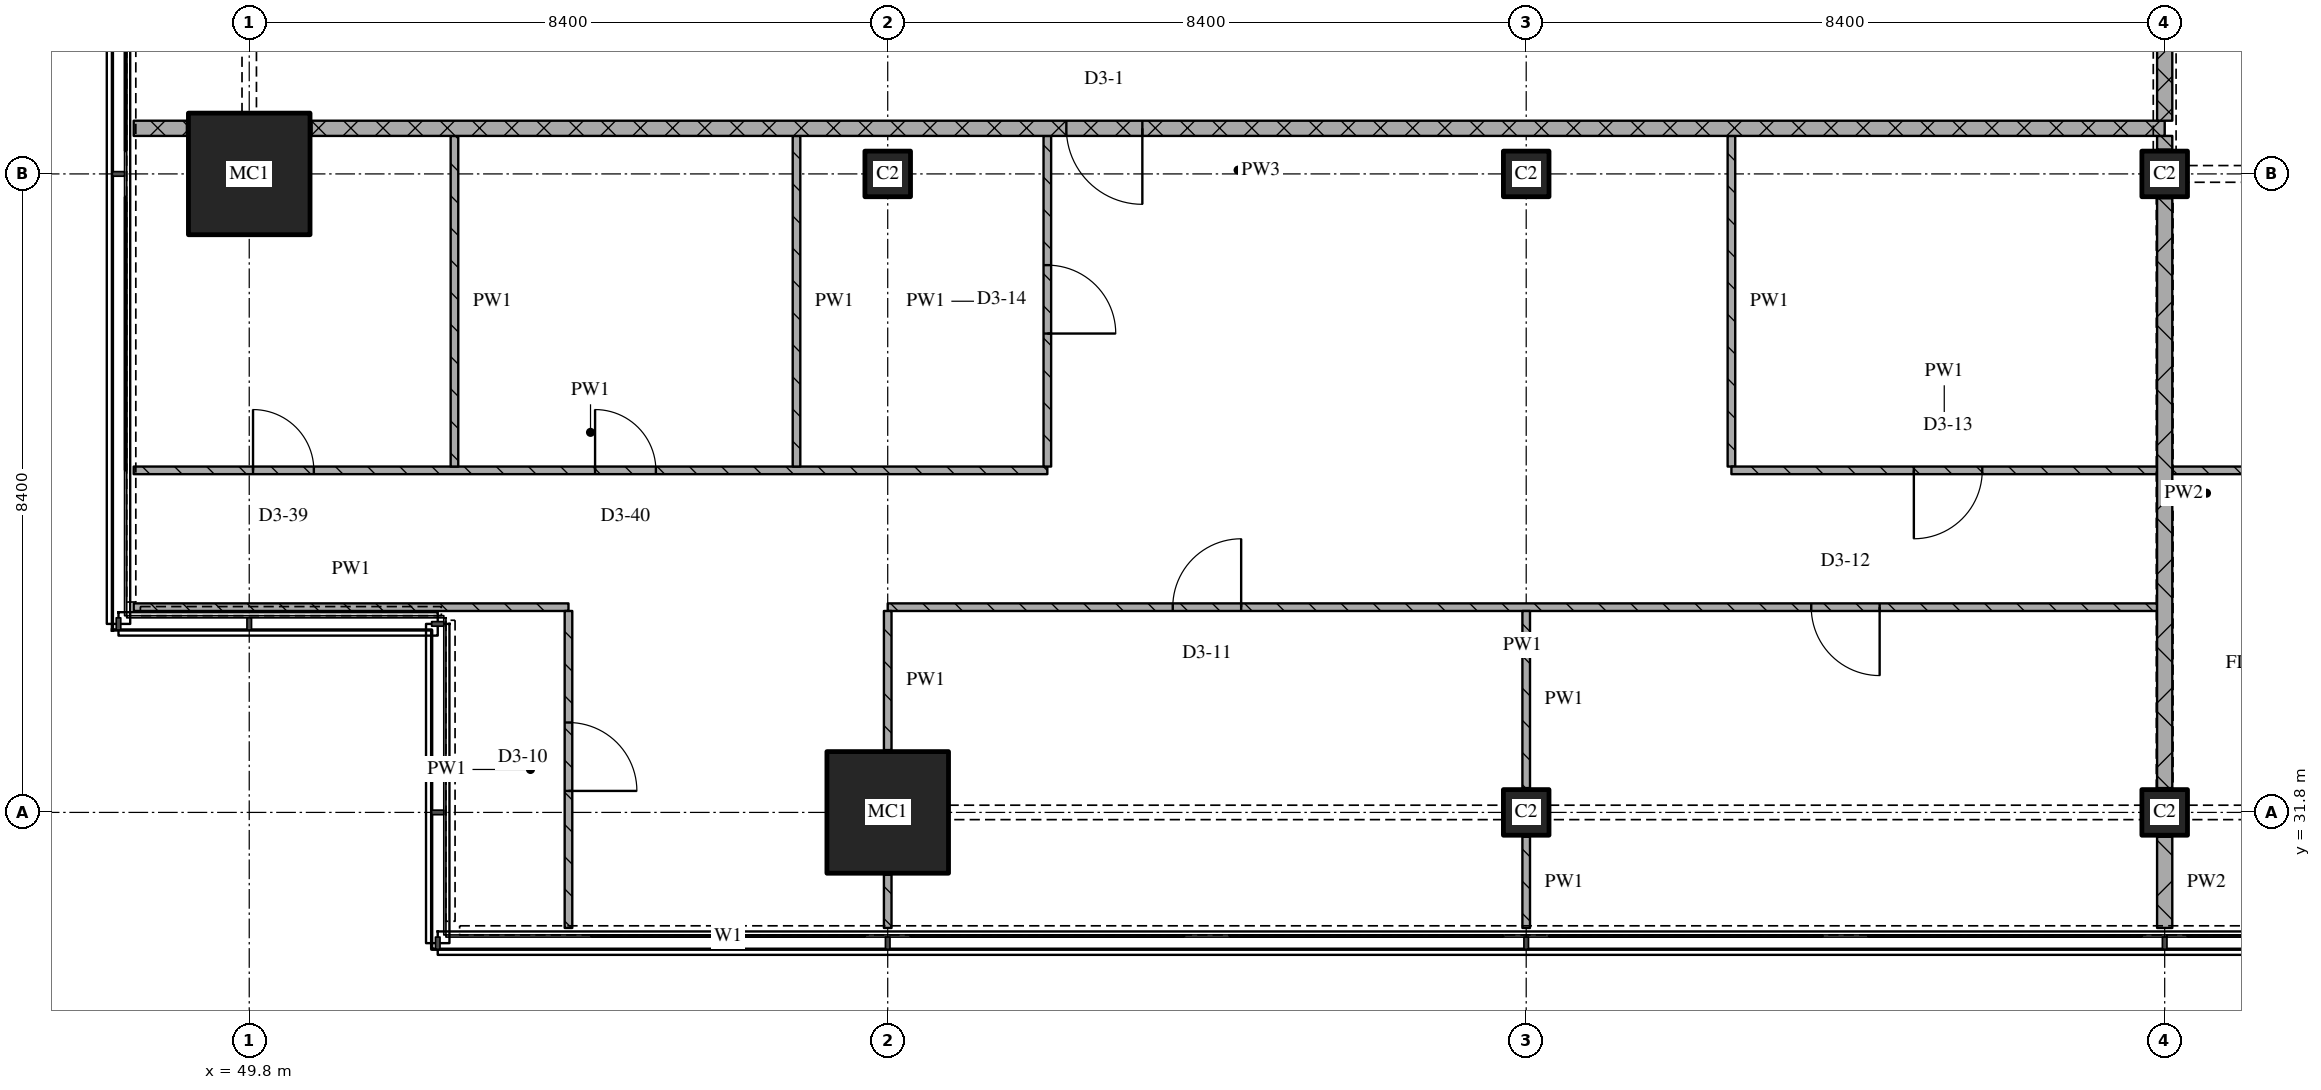
"""IFC4 building model, lengths in metres.
Left out: names, types, materials, properties, quantities, classifications, styles, units other than length and angle.
Written with IfcOpenShell. Run it as: python <this file> out.ifc"""

import sys

from ifc_helpers import new_model, si_unit, direction, frame, frame_2d, origin, origin_2d, place, context, subcontext, project, spatial, rectangle, extrude, element, fill, save


model = new_model("IFC4")
c1 = context("Model", 3, precision=1e-05, world=origin(), true_north=direction((0.0, 1.0)))
c2 = subcontext(c1, "Body", "Model", "MODEL_VIEW")
j1 = project(units=[si_unit("LENGTHUNIT", "METRE"), si_unit("PLANEANGLEUNIT", "RADIAN")], contexts=[c1])
p1 = place(None, origin())
s1 = spatial("IfcSite", under=j1, at=p1, CompositionType="ELEMENT")
p2 = place(p1, origin())
s2 = spatial("IfcBuilding", under=s1, at=p2, CompositionType="ELEMENT")
p3 = place(p2, frame((0.0, 0.0, 230.7)))
s3 = spatial("IfcBuildingStorey", under=s2, at=p3, CompositionType="ELEMENT", Elevation=230.7)
for number, where, z_axis, x_axis in (
    (1, (49.8, 40.2, 0.0), (0.0, 0.0, 1.0), (1.0, 0.0, 0.0)),
    (2, (58.2, 31.8, 0.0), (0.0, 0.0, 1.0), (1.0, 0.0, 0.0)),
):
    element("IfcColumn", number, at=place(p3, frame(where, z_axis=z_axis, x_axis=x_axis)), inside=s3, PredefinedType="COLUMN", context=c2, shape_type="SweptSolid", body=[
        extrude(rectangle(XDim=1.6, YDim=1.6, at=origin_2d()), origin(), (0.0, 0.0, 1.0), 3.6),
    ])
for number, where, z_axis, x_axis in (
    (3, (58.2, 40.2, 0.0), (0.0, 0.0, 1.0), (1.0, 0.0, 0.0)),
    (4, (66.6, 31.8, 0.0), (0.0, 0.0, 1.0), (1.0, 0.0, 0.0)),
    (5, (66.6, 40.2, 0.0), (0.0, 0.0, 1.0), (1.0, 0.0, 0.0)),
    (6, (75.0, 31.8, 0.0), (0.0, 0.0, 1.0), (1.0, 0.0, 0.0)),
    (7, (75.0, 40.2, 0.0), (0.0, 0.0, 1.0), (1.0, 0.0, 0.0)),
):
    element("IfcColumn", number, at=place(p3, frame(where, z_axis=z_axis, x_axis=x_axis)), inside=s3, PredefinedType="COLUMN", context=c2, shape_type="SweptSolid", body=[
        extrude(rectangle(XDim=0.6, YDim=0.6, at=origin_2d()), origin(), (0.0, 0.0, 1.0), 3.6),
    ])
p4 = place(p3, frame((48.28, 34.5, 0.0), z_axis=(0.0, 0.0, 1.0), x_axis=(1.0, 0.0, 0.0)))
e8 = element("IfcWall", 8, at=p4, inside=s3, PredefinedType="PARTITIONING", context=c2, shape_type="SweptSolid", body=[
    extrude(rectangle(XDim=5.72, YDim=0.1, at=frame_2d((2.86, 0.0))), origin(), (0.0, 0.0, 1.0), 3.32),
])
p5 = place(p3, frame((74.9, 34.5, 0.0), z_axis=(0.0, 0.0, 1.0), x_axis=(-1.0, 0.0, 0.0)))
e9 = element("IfcWall", 9, at=p5, inside=s3, PredefinedType="PARTITIONING", context=c2, shape_type="SweptSolid", body=[
    extrude(rectangle(XDim=16.7, YDim=0.1, at=frame_2d((8.35, 0.0))), origin(), (0.0, 0.0, 1.0), 3.32),
])
p6 = place(p5, frame((3.65, 0.0, 0.0)))
e10 = element("IfcOpeningElement", 10, at=p6, cuts=e9, PredefinedType="OPENING", context=c2, shape_type="SweptSolid", body=[
    extrude(rectangle(XDim=0.9, YDim=2.1, at=frame_2d((0.45, 1.05))), frame((0.0, 0.06, 0.0), z_axis=(0.0, -1.0, 0.0), x_axis=(1.0, 0.0, 0.0)), (0.0, 0.0, 1.0), 0.12),
])
p7 = place(p5, frame((12.05, 0.0, 0.0)))
e11 = element("IfcOpeningElement", 11, at=p7, cuts=e9, PredefinedType="OPENING", context=c2, shape_type="SweptSolid", body=[
    extrude(rectangle(XDim=0.9, YDim=2.1, at=frame_2d((0.45, 1.05))), frame((0.0, 0.06, 0.0), z_axis=(0.0, -1.0, 0.0), x_axis=(1.0, 0.0, 0.0)), (0.0, 0.0, 1.0), 0.12),
])
p8 = place(p3, frame((48.28, 36.3, 0.0), z_axis=(0.0, 0.0, 1.0), x_axis=(1.0, 0.0, 0.0)))
e12 = element("IfcWall", 12, at=p8, inside=s3, PredefinedType="PARTITIONING", context=c2, shape_type="SweptSolid", body=[
    extrude(rectangle(XDim=12.02, YDim=0.1, at=frame_2d((6.01, 0.0))), origin(), (0.0, 0.0, 1.0), 3.32),
])
p9 = place(p8, frame((1.57, 0.0, 0.0)))
e13 = element("IfcOpeningElement", 13, at=p9, cuts=e12, PredefinedType="OPENING", context=c2, shape_type="SweptSolid", body=[
    extrude(rectangle(XDim=0.8, YDim=2.1, at=frame_2d((0.4, 1.05))), frame((0.0, 0.06, 0.0), z_axis=(0.0, -1.0, 0.0), x_axis=(1.0, 0.0, 0.0)), (0.0, 0.0, 1.0), 0.12),
])
p10 = place(p8, frame((6.07, 0.0, 0.0)))
e14 = element("IfcOpeningElement", 14, at=p10, cuts=e12, PredefinedType="OPENING", context=c2, shape_type="SweptSolid", body=[
    extrude(rectangle(XDim=0.8, YDim=2.1, at=frame_2d((0.4, 1.05))), frame((0.0, 0.06, 0.0), z_axis=(0.0, -1.0, 0.0), x_axis=(1.0, 0.0, 0.0)), (0.0, 0.0, 1.0), 0.12),
])
p11 = place(p3, frame((48.28, 40.8, 0.0), z_axis=(0.0, 0.0, 1.0), x_axis=(1.0, 0.0, 0.0)))
e15 = element("IfcWall", 15, at=p11, inside=s3, PredefinedType="PARTITIONING", context=c2, shape_type="SweptSolid", body=[
    extrude(rectangle(XDim=0.7, YDim=0.2, at=frame_2d((0.35, 0.0))), origin(), (0.0, 0.0, 1.0), 3.32),
])
p12 = place(p3, frame((75.0, 40.8, 0.0), z_axis=(0.0, 0.0, 1.0), x_axis=(-1.0, 0.0, 0.0)))
e16 = element("IfcWall", 16, at=p12, inside=s3, PredefinedType="PARTITIONING", context=c2, shape_type="SweptSolid", body=[
    extrude(rectangle(XDim=24.38, YDim=0.2, at=frame_2d((12.19, 0.0))), origin(), (0.0, 0.0, 1.0), 3.32),
])
p13 = place(p12, frame((13.45, 0.0, 0.0)))
e17 = element("IfcOpeningElement", 17, at=p13, cuts=e16, PredefinedType="OPENING", context=c2, shape_type="SweptSolid", body=[
    extrude(rectangle(XDim=1.0, YDim=2.1, at=frame_2d((0.5, 1.05))), frame((0.0, 0.11, 0.0), z_axis=(0.0, -1.0, 0.0), x_axis=(1.0, 0.0, 0.0)), (0.0, 0.0, 1.0), 0.22),
])
p14 = place(p3, frame((52.5, 40.7, 0.0), z_axis=(0.0, 0.0, 1.0), x_axis=(0.0, -1.0, 0.0)))
e18 = element("IfcWall", 18, at=p14, inside=s3, PredefinedType="PARTITIONING", context=c2, shape_type="SweptSolid", body=[
    extrude(rectangle(XDim=4.35, YDim=0.1, at=frame_2d((2.175, 0.0))), origin(), (0.0, 0.0, 1.0), 3.32),
])
p15 = place(p3, frame((54.0, 30.28, 0.0), z_axis=(0.0, 0.0, 1.0), x_axis=(0.0, 1.0, 0.0)))
e19 = element("IfcWall", 19, at=p15, inside=s3, PredefinedType="PARTITIONING", context=c2, shape_type="SweptSolid", body=[
    extrude(rectangle(XDim=4.17, YDim=0.1, at=frame_2d((2.085, 0.0))), origin(), (0.0, 0.0, 1.0), 3.32),
])
p16 = place(p15, frame((1.803, 0.0, 0.0)))
e20 = element("IfcOpeningElement", 20, at=p16, cuts=e19, PredefinedType="OPENING", context=c2, shape_type="SweptSolid", body=[
    extrude(rectangle(XDim=0.9, YDim=2.1, at=frame_2d((0.45, 1.05))), frame((0.0, 0.06, 0.0), z_axis=(0.0, -1.0, 0.0), x_axis=(1.0, 0.0, 0.0)), (0.0, 0.0, 1.0), 0.12),
])
p17 = place(p3, frame((57.0, 40.7, 0.0), z_axis=(0.0, 0.0, 1.0), x_axis=(0.0, -1.0, 0.0)))
e21 = element("IfcWall", 21, at=p17, inside=s3, PredefinedType="PARTITIONING", context=c2, shape_type="SweptSolid", body=[
    extrude(rectangle(XDim=4.35, YDim=0.1, at=frame_2d((2.175, 0.0))), origin(), (0.0, 0.0, 1.0), 3.32),
])
p18 = place(p3, frame((58.2, 30.98, 0.0), z_axis=(0.0, 0.0, 1.0), x_axis=(0.0, -1.0, 0.0)))
e22 = element("IfcWall", 22, at=p18, inside=s3, PredefinedType="PARTITIONING", context=c2, shape_type="SweptSolid", body=[
    extrude(rectangle(XDim=0.7, YDim=0.1, at=frame_2d((0.35, 0.0))), origin(), (0.0, 0.0, 1.0), 3.32),
])
p19 = place(p3, frame((58.2, 34.45, 0.0), z_axis=(0.0, 0.0, 1.0), x_axis=(0.0, -1.0, 0.0)))
e23 = element("IfcWall", 23, at=p19, inside=s3, PredefinedType="PARTITIONING", context=c2, shape_type="SweptSolid", body=[
    extrude(rectangle(XDim=1.83, YDim=0.1, at=frame_2d((0.915, 0.0))), origin(), (0.0, 0.0, 1.0), 3.32),
])
p20 = place(p3, frame((60.3, 36.35, 0.0), z_axis=(0.0, 0.0, 1.0), x_axis=(0.0, 1.0, 0.0)))
e24 = element("IfcWall", 24, at=p20, inside=s3, PredefinedType="PARTITIONING", context=c2, shape_type="SweptSolid", body=[
    extrude(rectangle(XDim=4.35, YDim=0.1, at=frame_2d((2.175, 0.0))), origin(), (0.0, 0.0, 1.0), 3.32),
])
p21 = place(p20, frame((1.75, 0.0, 0.0)))
e25 = element("IfcOpeningElement", 25, at=p21, cuts=e24, PredefinedType="OPENING", context=c2, shape_type="SweptSolid", body=[
    extrude(rectangle(XDim=0.9, YDim=2.1, at=frame_2d((0.45, 1.05))), frame((0.0, 0.06, 0.0), z_axis=(0.0, -1.0, 0.0), x_axis=(1.0, 0.0, 0.0)), (0.0, 0.0, 1.0), 0.12),
])
p22 = place(p3, frame((66.6, 31.48, 0.0), z_axis=(0.0, 0.0, 1.0), x_axis=(0.0, -1.0, 0.0)))
e26 = element("IfcWall", 26, at=p22, inside=s3, PredefinedType="PARTITIONING", context=c2, shape_type="SweptSolid", body=[
    extrude(rectangle(XDim=1.2, YDim=0.1, at=frame_2d((0.6, 0.0))), origin(), (0.0, 0.0, 1.0), 3.32),
])
p23 = place(p3, frame((66.6, 34.45, 0.0), z_axis=(0.0, 0.0, 1.0), x_axis=(0.0, -1.0, 0.0)))
e27 = element("IfcWall", 27, at=p23, inside=s3, PredefinedType="PARTITIONING", context=c2, shape_type="SweptSolid", body=[
    extrude(rectangle(XDim=2.33, YDim=0.1, at=frame_2d((1.165, 0.0))), origin(), (0.0, 0.0, 1.0), 3.32),
])
p24 = place(p3, frame((69.3, 40.7, 0.0), z_axis=(0.0, 0.0, 1.0), x_axis=(0.0, -1.0, 0.0)))
e28 = element("IfcWall", 28, at=p24, inside=s3, PredefinedType="PARTITIONING", context=c2, shape_type="SweptSolid", body=[
    extrude(rectangle(XDim=4.35, YDim=0.1, at=frame_2d((2.175, 0.0))), origin(), (0.0, 0.0, 1.0), 3.32),
])
p25 = place(p3, frame((75.0, 43.1, 0.0), z_axis=(0.0, 0.0, 1.0), x_axis=(0.0, -1.0, 0.0)))
e29 = element("IfcWall", 29, at=p25, inside=s3, PredefinedType="PARTITIONING", context=c2, shape_type="SweptSolid", body=[
    extrude(rectangle(XDim=2.2, YDim=0.2, at=frame_2d((1.1, 0.0))), origin(), (0.0, 0.0, 1.0), 2.53),
])
p26 = place(p3, frame((75.0, 31.48, 0.0), z_axis=(0.0, 0.0, 1.0), x_axis=(0.0, -1.0, 0.0)))
e30 = element("IfcWall", 30, at=p26, inside=s3, PredefinedType="PARTITIONING", context=c2, shape_type="SweptSolid", body=[
    extrude(rectangle(XDim=1.2, YDim=0.2, at=frame_2d((0.6, 0.0))), origin(), (0.0, 0.0, 1.0), 3.32),
])
p27 = place(p3, frame((75.0, 39.88, 0.0), z_axis=(0.0, 0.0, 1.0), x_axis=(0.0, -1.0, 0.0)))
e31 = element("IfcWall", 31, at=p27, inside=s3, PredefinedType="PARTITIONING", context=c2, shape_type="SweptSolid", body=[
    extrude(rectangle(XDim=7.76, YDim=0.2, at=frame_2d((3.88, 0.0))), origin(), (0.0, 0.0, 1.0), 2.72),
])
p28 = place(p3, frame((75.0, 40.7, 0.0), z_axis=(0.0, 0.0, 1.0), x_axis=(0.0, -1.0, 0.0)))
e32 = element("IfcWall", 32, at=p28, inside=s3, PredefinedType="PARTITIONING", context=c2, shape_type="SweptSolid", body=[
    extrude(rectangle(XDim=0.18, YDim=0.2, at=frame_2d((0.09, 0.0))), origin(), (0.0, 0.0, 1.0), 3.32),
])
p29 = place(p3, frame((69.3, 36.3, 0.0), z_axis=(0.0, 0.0, 1.0), x_axis=(1.0, 0.0, 0.0)))
e33 = element("IfcWall", 33, at=p29, inside=s3, PredefinedType="PARTITIONING", context=c2, shape_type="SweptSolid", body=[
    extrude(rectangle(XDim=5.6, YDim=0.1, at=frame_2d((2.8, 0.0))), origin(), (0.0, 0.0, 1.0), 3.32),
])
p30 = place(p29, frame((2.4, 0.0, 0.0)))
e34 = element("IfcOpeningElement", 34, at=p30, cuts=e33, PredefinedType="OPENING", context=c2, shape_type="SweptSolid", body=[
    extrude(rectangle(XDim=0.9, YDim=2.1, at=frame_2d((0.45, 1.05))), frame((0.0, 0.06, 0.0), z_axis=(0.0, -1.0, 0.0), x_axis=(1.0, 0.0, 0.0)), (0.0, 0.0, 1.0), 0.12),
])
p31 = place(p3, frame((75.1, 36.3, 0.0), z_axis=(0.0, 0.0, 1.0), x_axis=(1.0, 0.0, 0.0)))
e35 = element("IfcWall", 35, at=p31, inside=s3, PredefinedType="PARTITIONING", context=c2, shape_type="SweptSolid", body=[
    extrude(rectangle(XDim=10.4, YDim=0.1, at=frame_2d((5.2, 0.0))), origin(), (0.0, 0.0, 1.0), 3.32),
])
p32 = place(p31, frame((1.42, 0.0, 0.0)))
e36 = element("IfcOpeningElement", 36, at=p32, cuts=e35, PredefinedType="OPENING", context=c2, shape_type="SweptSolid", body=[
    extrude(rectangle(XDim=0.8, YDim=2.1, at=frame_2d((0.4, 1.05))), frame((0.0, 0.06, 0.0), z_axis=(0.0, -1.0, 0.0), x_axis=(1.0, 0.0, 0.0)), (0.0, 0.0, 1.0), 0.12),
])
p33 = place(p31, frame((5.261, 0.0, 0.0)))
e37 = element("IfcOpeningElement", 37, at=p33, cuts=e35, PredefinedType="OPENING", context=c2, shape_type="SweptSolid", body=[
    extrude(rectangle(XDim=0.8, YDim=2.1, at=frame_2d((0.4, 1.05))), frame((0.0, 0.06, 0.0), z_axis=(0.0, -1.0, 0.0), x_axis=(1.0, 0.0, 0.0)), (0.0, 0.0, 1.0), 0.12),
])
p34 = place(p31, frame((8.541, 0.0, 0.0)))
e38 = element("IfcOpeningElement", 38, at=p34, cuts=e35, PredefinedType="OPENING", context=c2, shape_type="SweptSolid", body=[
    extrude(rectangle(XDim=0.9, YDim=2.1, at=frame_2d((0.45, 1.05))), frame((0.0, 0.06, 0.0), z_axis=(0.0, -1.0, 0.0), x_axis=(1.0, 0.0, 0.0)), (0.0, 0.0, 1.0), 0.12),
])
p35 = place(p6, origin())
e39 = element("IfcDoor", 39, at=p35, inside=s3, OperationType="SINGLE_SWING_LEFT", PredefinedType="DOOR", context=c2, shape_type="SweptSolid", body=[
    extrude(rectangle(XDim=0.9, YDim=2.1, at=frame_2d((0.45, 1.05))), frame((0.0, 0.025, 0.0), z_axis=(0.0, -1.0, 0.0), x_axis=(1.0, 0.0, 0.0)), (0.0, 0.0, 1.0), 0.05),
])
fill(e10, e39)
p36 = place(p7, origin())
e40 = element("IfcDoor", 40, at=p36, inside=s3, OperationType="SINGLE_SWING_RIGHT", PredefinedType="DOOR", context=c2, shape_type="SweptSolid", body=[
    extrude(rectangle(XDim=0.9, YDim=2.1, at=frame_2d((0.45, 1.05))), frame((0.0, 0.025, 0.0), z_axis=(0.0, -1.0, 0.0), x_axis=(1.0, 0.0, 0.0)), (0.0, 0.0, 1.0), 0.05),
])
fill(e11, e40)
p37 = place(p9, origin())
e41 = element("IfcDoor", 41, at=p37, inside=s3, OperationType="SINGLE_SWING_LEFT", PredefinedType="DOOR", context=c2, shape_type="SweptSolid", body=[
    extrude(rectangle(XDim=0.8, YDim=2.1, at=frame_2d((0.4, 1.05))), frame((0.0, 0.025, 0.0), z_axis=(0.0, -1.0, 0.0), x_axis=(1.0, 0.0, 0.0)), (0.0, 0.0, 1.0), 0.05),
])
fill(e13, e41)
p38 = place(p10, origin())
e42 = element("IfcDoor", 42, at=p38, inside=s3, OperationType="SINGLE_SWING_LEFT", PredefinedType="DOOR", context=c2, shape_type="SweptSolid", body=[
    extrude(rectangle(XDim=0.8, YDim=2.1, at=frame_2d((0.4, 1.05))), frame((0.0, 0.025, 0.0), z_axis=(0.0, -1.0, 0.0), x_axis=(1.0, 0.0, 0.0)), (0.0, 0.0, 1.0), 0.05),
])
fill(e14, e42)
p39 = place(p13, origin())
e43 = element("IfcDoor", 43, at=p39, inside=s3, OperationType="SINGLE_SWING_LEFT", PredefinedType="DOOR", context=c2, shape_type="SweptSolid", body=[
    extrude(rectangle(XDim=1.0, YDim=2.1, at=frame_2d((0.5, 1.05))), frame((0.0, 0.025, 0.0), z_axis=(0.0, -1.0, 0.0), x_axis=(1.0, 0.0, 0.0)), (0.0, 0.0, 1.0), 0.05),
])
fill(e17, e43)
p40 = place(p16, origin())
e44 = element("IfcDoor", 44, at=p40, inside=s3, OperationType="SINGLE_SWING_RIGHT", PredefinedType="DOOR", context=c2, shape_type="SweptSolid", body=[
    extrude(rectangle(XDim=0.9, YDim=2.1, at=frame_2d((0.45, 1.05))), frame((0.0, 0.025, 0.0), z_axis=(0.0, -1.0, 0.0), x_axis=(1.0, 0.0, 0.0)), (0.0, 0.0, 1.0), 0.05),
])
fill(e20, e44)
p41 = place(p21, origin())
e45 = element("IfcDoor", 45, at=p41, inside=s3, OperationType="SINGLE_SWING_RIGHT", PredefinedType="DOOR", context=c2, shape_type="SweptSolid", body=[
    extrude(rectangle(XDim=0.9, YDim=2.1, at=frame_2d((0.45, 1.05))), frame((0.0, 0.025, 0.0), z_axis=(0.0, -1.0, 0.0), x_axis=(1.0, 0.0, 0.0)), (0.0, 0.0, 1.0), 0.05),
])
fill(e25, e45)
p42 = place(p30, origin())
e46 = element("IfcDoor", 46, at=p42, inside=s3, OperationType="SINGLE_SWING_RIGHT", PredefinedType="DOOR", context=c2, shape_type="SweptSolid", body=[
    extrude(rectangle(XDim=0.9, YDim=2.1, at=frame_2d((0.45, 1.05))), frame((0.0, 0.025, 0.0), z_axis=(0.0, -1.0, 0.0), x_axis=(1.0, 0.0, 0.0)), (0.0, 0.0, 1.0), 0.05),
])
fill(e34, e46)
save(model, sys.argv[1])
